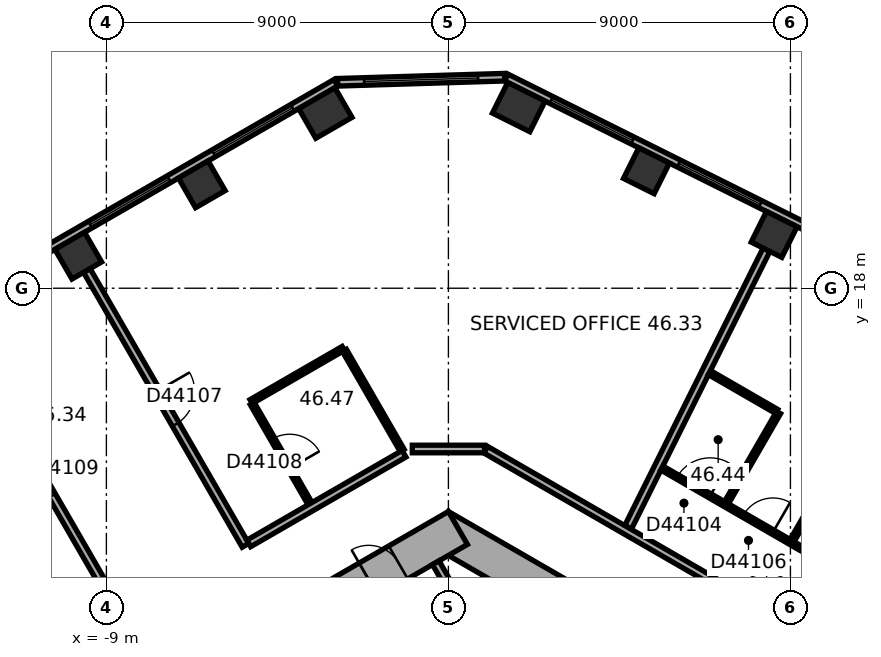
"""IFC4 building model, lengths in metres.
Left out: names, types, materials, properties, quantities, classifications, styles, units other than length and angle.
Written with IfcOpenShell. Run it as: python <this file> out.ifc"""

import sys

from ifc_helpers import new_model, si_unit, direction, frame, frame_2d, origin, origin_2d, place, context, subcontext, project, spatial, rectangle, extrude, element, fill, save


model = new_model("IFC4")
c1 = context("Model", 3, precision=1e-05, world=origin(), true_north=direction((0.0, 1.0)))
c2 = subcontext(c1, "Body", "Model", "MODEL_VIEW")
j1 = project(units=[si_unit("LENGTHUNIT", "METRE"), si_unit("PLANEANGLEUNIT", "RADIAN")], contexts=[c1])
p1 = place(None, origin())
s1 = spatial("IfcSite", under=j1, at=p1, CompositionType="ELEMENT")
p2 = place(p1, origin())
s2 = spatial("IfcBuilding", under=s1, at=p2, CompositionType="ELEMENT")
p3 = place(p2, frame((0.0, 0.0, 187.3)))
s3 = spatial("IfcBuildingStorey", under=s2, at=p3, CompositionType="ELEMENT", Elevation=187.3)
for number, where, z_axis, x_axis in (
    (1, (8.571, 19.416, 0.0), (0.0, 0.0, 1.0), (-0.895, 0.446, 0.0)),
    (2, (5.211, 21.091, 0.0), (0.0, 0.0, 1.0), (-0.895, 0.446, 0.0)),
):
    element("IfcColumn", number, at=place(p3, frame(where, z_axis=z_axis, x_axis=x_axis)), inside=s3, PredefinedType="COLUMN", context=c2, shape_type="SweptSolid", body=[
        extrude(rectangle(XDim=0.9, YDim=0.9, at=origin_2d()), origin(), (0.0, 0.0, 1.0), 3.7),
    ])
for number, where, z_axis, x_axis in (
    (3, (1.852, 22.766, 0.0), (0.0, 0.0, 1.0), (-0.895, 0.446, 0.0)),
    (4, (-3.238, 22.61, 0.0), (0.0, 0.0, 1.0), (-0.866, -0.5, 0.0)),
):
    element("IfcColumn", number, at=place(p3, frame(where, z_axis=z_axis, x_axis=x_axis)), inside=s3, PredefinedType="COLUMN", context=c2, shape_type="SweptSolid", body=[
        extrude(rectangle(XDim=1.1, YDim=0.9, at=origin_2d()), origin(), (0.0, 0.0, 1.0), 3.7),
    ])
for number, where, z_axis, x_axis in (
    (5, (-6.489, 20.733, 0.0), (0.0, 0.0, 1.0), (-0.866, -0.5, 0.0)),
    (6, (-9.74, 18.856, 0.0), (0.0, 0.0, 1.0), (-0.866, -0.5, 0.0)),
):
    element("IfcColumn", number, at=place(p3, frame(where, z_axis=z_axis, x_axis=x_axis)), inside=s3, PredefinedType="COLUMN", context=c2, shape_type="SweptSolid", body=[
        extrude(rectangle(XDim=0.9, YDim=0.9, at=origin_2d()), origin(), (0.0, 0.0, 1.0), 3.7),
    ])
p4 = place(p3, frame((10.25, 5.629, 0.0), z_axis=(0.0, 0.0, 1.0), x_axis=(-0.866022616891, 0.50000482701, 0.0)))
e7 = element("IfcWall", 7, at=p4, inside=s3, PredefinedType="SHEAR", context=c2, shape_type="SweptSolid", body=[
    extrude(rectangle(XDim=12.125, YDim=1.0, at=frame_2d((6.062, 0.0))), origin(), (0.0, 0.0, 1.0), 3.7),
])
p5 = place(p4, frame((5.312, 0.0, 0.0)))
e8 = element("IfcOpeningElement", 8, at=p5, cuts=e7, PredefinedType="OPENING", context=c2, shape_type="SweptSolid", body=[
    extrude(rectangle(XDim=0.9, YDim=2.1, at=frame_2d((0.45, 1.05))), frame((0.0, 0.51, 0.0), z_axis=(0.0, -1.0, 0.0), x_axis=(1.0, 0.0, 0.0)), (0.0, 0.0, 1.0), 1.02),
])
p6 = place(p3, frame((0.25, 11.691, 0.0), z_axis=(0.0, 0.0, 1.0), x_axis=(-0.866022616891, -0.50000482701, 0.0)))
e9 = element("IfcWall", 9, at=p6, inside=s3, PredefinedType="SHEAR", context=c2, shape_type="SweptSolid", body=[
    extrude(rectangle(XDim=12.125, YDim=1.0, at=frame_2d((6.062, 0.0))), origin(), (0.0, 0.0, 1.0), 3.7),
])
p7 = place(p6, frame((6.262, 0.0, 0.0)))
e10 = element("IfcOpeningElement", 10, at=p7, cuts=e9, PredefinedType="OPENING", context=c2, shape_type="SweptSolid", body=[
    extrude(rectangle(XDim=1.5, YDim=2.1, at=frame_2d((0.75, 1.05))), frame((0.0, 0.51, 0.0), z_axis=(0.0, -1.0, 0.0), x_axis=(1.0, 0.0, 0.0)), (0.0, 0.0, 1.0), 1.02),
])
p8 = place(p6, frame((1.812, 0.0, 0.0)))
e11 = element("IfcOpeningElement", 11, at=p8, cuts=e9, PredefinedType="OPENING", context=c2, shape_type="SweptSolid", body=[
    extrude(rectangle(XDim=0.9, YDim=2.1, at=frame_2d((0.45, 1.05))), frame((0.0, 0.51, 0.0), z_axis=(0.0, -1.0, 0.0), x_axis=(1.0, 0.0, 0.0)), (0.0, 0.0, 1.0), 1.02),
])
p9 = place(p6, frame((4.412, 0.0, 0.0)))
e12 = element("IfcOpeningElement", 12, at=p9, cuts=e9, PredefinedType="OPENING", context=c2, shape_type="SweptSolid", body=[
    extrude(rectangle(XDim=0.9, YDim=2.1, at=frame_2d((0.45, 1.05))), frame((0.0, 0.51, 0.0), z_axis=(0.0, -1.0, 0.0), x_axis=(1.0, 0.0, 0.0)), (0.0, 0.0, 1.0), 1.02),
])
p10 = place(p3, frame((19.464, 14.599, 0.0), z_axis=(0.0, 0.0, 1.0), x_axis=(-0.894935755043, 0.446195018289, 0.0)))
e13 = element("IfcWall", 13, at=p10, inside=s3, PredefinedType="STANDARD", context=c2, shape_type="SweptSolid", body=[
    extrude(rectangle(XDim=20.044, YDim=0.2, at=frame_2d((10.022, 0.0))), origin(), (0.0, 0.0, 1.0), 3.7),
])
p11 = place(p10, frame((1.313, 0.0, 0.9)))
e14 = element("IfcOpeningElement", 14, at=p11, cuts=e13, PredefinedType="OPENING", context=c2, shape_type="SweptSolid", body=[
    extrude(rectangle(XDim=2.4, YDim=2.0, at=frame_2d((1.2, 1.0))), frame((0.0, 0.11, 0.0), z_axis=(0.0, -1.0, 0.0), x_axis=(1.0, 0.0, 0.0)), (0.0, 0.0, 1.0), 0.22),
])
p12 = place(p10, frame((5.067, 0.0, 0.9)))
e15 = element("IfcOpeningElement", 15, at=p12, cuts=e13, PredefinedType="OPENING", context=c2, shape_type="SweptSolid", body=[
    extrude(rectangle(XDim=2.4, YDim=2.0, at=frame_2d((1.2, 1.0))), frame((0.0, 0.11, 0.0), z_axis=(0.0, -1.0, 0.0), x_axis=(1.0, 0.0, 0.0)), (0.0, 0.0, 1.0), 0.22),
])
p13 = place(p10, frame((8.821, 0.0, 0.9)))
e16 = element("IfcOpeningElement", 16, at=p13, cuts=e13, PredefinedType="OPENING", context=c2, shape_type="SweptSolid", body=[
    extrude(rectangle(XDim=2.4, YDim=2.0, at=frame_2d((1.2, 1.0))), frame((0.0, 0.11, 0.0), z_axis=(0.0, -1.0, 0.0), x_axis=(1.0, 0.0, 0.0)), (0.0, 0.0, 1.0), 0.22),
])
p14 = place(p10, frame((12.575, 0.0, 0.9)))
e17 = element("IfcOpeningElement", 17, at=p14, cuts=e13, PredefinedType="OPENING", context=c2, shape_type="SweptSolid", body=[
    extrude(rectangle(XDim=2.4, YDim=2.0, at=frame_2d((1.2, 1.0))), frame((0.0, 0.11, 0.0), z_axis=(0.0, -1.0, 0.0), x_axis=(1.0, 0.0, 0.0)), (0.0, 0.0, 1.0), 0.22),
])
p15 = place(p10, frame((16.329, 0.0, 0.9)))
e18 = element("IfcOpeningElement", 18, at=p15, cuts=e13, PredefinedType="OPENING", context=c2, shape_type="SweptSolid", body=[
    extrude(rectangle(XDim=2.4, YDim=2.0, at=frame_2d((1.2, 1.0))), frame((0.0, 0.11, 0.0), z_axis=(0.0, -1.0, 0.0), x_axis=(1.0, 0.0, 0.0)), (0.0, 0.0, 1.0), 0.22),
])
p16 = place(p3, frame((1.479, 23.553, 0.0), z_axis=(0.0, 0.0, 1.0), x_axis=(-0.999534786117, -0.03049936625, 0.0)))
e19 = element("IfcWall", 19, at=p16, inside=s3, PredefinedType="STANDARD", context=c2, shape_type="SweptSolid", body=[
    extrude(rectangle(XDim=4.395, YDim=0.2, at=frame_2d((2.197, 0.0))), origin(), (0.0, 0.0, 1.0), 3.7),
])
p17 = place(p16, frame((0.698, 0.0, 0.9)))
e20 = element("IfcOpeningElement", 20, at=p17, cuts=e19, PredefinedType="OPENING", context=c2, shape_type="SweptSolid", body=[
    extrude(rectangle(XDim=3.0, YDim=2.0, at=frame_2d((1.5, 1.0))), frame((0.0, 0.11, 0.0), z_axis=(0.0, -1.0, 0.0), x_axis=(1.0, 0.0, 0.0)), (0.0, 0.0, 1.0), 0.22),
])
p18 = place(p3, frame((-2.961, 23.405, 0.0), z_axis=(0.0, 0.0, 1.0), x_axis=(-0.866023315909, -0.500003616288, 0.0)))
e21 = element("IfcWall", 21, at=p18, inside=s3, PredefinedType="STANDARD", context=c2, shape_type="SweptSolid", body=[
    extrude(rectangle(XDim=20.044, YDim=0.2, at=frame_2d((10.022, 0.0))), origin(), (0.0, 0.0, 1.0), 3.7),
])
p19 = place(p18, frame((1.314, 0.0, 0.9)))
e22 = element("IfcOpeningElement", 22, at=p19, cuts=e21, PredefinedType="OPENING", context=c2, shape_type="SweptSolid", body=[
    extrude(rectangle(XDim=2.4, YDim=2.0, at=frame_2d((1.2, 1.0))), frame((0.0, 0.11, 0.0), z_axis=(0.0, -1.0, 0.0), x_axis=(1.0, 0.0, 0.0)), (0.0, 0.0, 1.0), 0.22),
])
p20 = place(p18, frame((5.069, 0.0, 0.9)))
e23 = element("IfcOpeningElement", 23, at=p20, cuts=e21, PredefinedType="OPENING", context=c2, shape_type="SweptSolid", body=[
    extrude(rectangle(XDim=2.4, YDim=2.0, at=frame_2d((1.2, 1.0))), frame((0.0, 0.11, 0.0), z_axis=(0.0, -1.0, 0.0), x_axis=(1.0, 0.0, 0.0)), (0.0, 0.0, 1.0), 0.22),
])
p21 = place(p18, frame((8.823, 0.0, 0.9)))
e24 = element("IfcOpeningElement", 24, at=p21, cuts=e21, PredefinedType="OPENING", context=c2, shape_type="SweptSolid", body=[
    extrude(rectangle(XDim=2.4, YDim=2.0, at=frame_2d((1.2, 1.0))), frame((0.0, 0.11, 0.0), z_axis=(0.0, -1.0, 0.0), x_axis=(1.0, 0.0, 0.0)), (0.0, 0.0, 1.0), 0.22),
])
p22 = place(p18, frame((12.577, 0.0, 0.9)))
e25 = element("IfcOpeningElement", 25, at=p22, cuts=e21, PredefinedType="OPENING", context=c2, shape_type="SweptSolid", body=[
    extrude(rectangle(XDim=2.4, YDim=2.0, at=frame_2d((1.2, 1.0))), frame((0.0, 0.11, 0.0), z_axis=(0.0, -1.0, 0.0), x_axis=(1.0, 0.0, 0.0)), (0.0, 0.0, 1.0), 0.22),
])
p23 = place(p18, frame((16.331, 0.0, 0.9)))
e26 = element("IfcOpeningElement", 26, at=p23, cuts=e21, PredefinedType="OPENING", context=c2, shape_type="SweptSolid", body=[
    extrude(rectangle(XDim=2.4, YDim=2.0, at=frame_2d((1.2, 1.0))), frame((0.0, 0.11, 0.0), z_axis=(0.0, -1.0, 0.0), x_axis=(1.0, 0.0, 0.0)), (0.0, 0.0, 1.0), 0.22),
])
p24 = place(p3, frame((0.767, 8.872, 0.0), z_axis=(0.0, 0.0, 1.0), x_axis=(-0.499994660107, 0.866028486751, 0.0)))
e27 = element("IfcWall", 27, at=p24, inside=s3, PredefinedType="PARTITIONING", context=c2, shape_type="SweptSolid", body=[
    extrude(rectangle(XDim=2.2, YDim=0.2, at=frame_2d((1.1, 0.0))), origin(), (0.0, 0.0, 1.0), 3.42),
])
p25 = place(p3, frame((-12.766, 16.589, 0.0), z_axis=(0.0, 0.0, 1.0), x_axis=(0.500010139422, -0.866019549707, 0.0)))
e28 = element("IfcWall", 28, at=p25, inside=s3, PredefinedType="PARTITIONING", context=c2, shape_type="SweptSolid", body=[
    extrude(rectangle(XDim=8.35, YDim=0.2, at=frame_2d((4.175, 0.0))), origin(), (0.0, 0.0, 1.0), 3.42),
])
p26 = place(p25, frame((3.675, 0.0, 0.0)))
e29 = element("IfcOpeningElement", 29, at=p26, cuts=e28, PredefinedType="OPENING", context=c2, shape_type="SweptSolid", body=[
    extrude(rectangle(XDim=1.0, YDim=2.1, at=frame_2d((0.5, 1.05))), frame((0.0, 0.11, 0.0), z_axis=(0.0, -1.0, 0.0), x_axis=(1.0, 0.0, 0.0)), (0.0, 0.0, 1.0), 0.22),
])
p27 = place(p3, frame((-9.515, 18.466, 0.0), z_axis=(0.0, 0.0, 1.0), x_axis=(0.500010139422, -0.866019549707, 0.0)))
e30 = element("IfcWall", 30, at=p27, inside=s3, PredefinedType="PARTITIONING", context=c2, shape_type="SweptSolid", body=[
    extrude(rectangle(XDim=8.35, YDim=0.2, at=frame_2d((4.175, 0.0))), origin(), (0.0, 0.0, 1.0), 2.87),
])
p28 = place(p27, frame((3.675, 0.0, 0.0)))
e31 = element("IfcOpeningElement", 31, at=p28, cuts=e30, PredefinedType="OPENING", context=c2, shape_type="SweptSolid", body=[
    extrude(rectangle(XDim=1.0, YDim=2.1, at=frame_2d((0.5, 1.05))), frame((0.0, 0.11, 0.0), z_axis=(0.0, -1.0, 0.0), x_axis=(1.0, 0.0, 0.0)), (0.0, 0.0, 1.0), 0.22),
])
p29 = place(p3, frame((-5.191, 15.016, 0.0), z_axis=(0.0, 0.0, 1.0), x_axis=(0.866034573852, 0.49998411664, 0.0)))
e32 = element("IfcWall", 32, at=p29, inside=s3, PredefinedType="PARTITIONING", context=c2, shape_type="SweptSolid", body=[
    extrude(rectangle(XDim=2.8, YDim=0.12, at=frame_2d((1.4, 0.0))), origin(), (0.0, 0.0, 1.0), 3.42),
])
p30 = place(p3, frame((-3.641, 12.331, 0.0), z_axis=(0.0, 0.0, 1.0), x_axis=(-0.499991248344, 0.866030456496, 0.0)))
e33 = element("IfcWall", 33, at=p30, inside=s3, PredefinedType="PARTITIONING", context=c2, shape_type="SweptSolid", body=[
    extrude(rectangle(XDim=3.04, YDim=0.12, at=frame_2d((1.52, 0.0))), origin(), (0.0, 0.0, 1.0), 3.42),
])
p31 = place(p30, frame((1.07, 0.0, 0.0)))
e34 = element("IfcOpeningElement", 34, at=p31, cuts=e33, PredefinedType="OPENING", context=c2, shape_type="SweptSolid", body=[
    extrude(rectangle(XDim=0.9, YDim=2.1, at=frame_2d((0.45, 1.05))), frame((0.0, 0.07, 0.0), z_axis=(0.0, -1.0, 0.0), x_axis=(1.0, 0.0, 0.0)), (0.0, 0.0, 1.0), 0.14),
])
p32 = place(p3, frame((-2.737, 16.364, 0.0), z_axis=(0.0, 0.0, 1.0), x_axis=(0.500026023896, -0.86601037836, 0.0)))
e35 = element("IfcWall", 35, at=p32, inside=s3, PredefinedType="PARTITIONING", context=c2, shape_type="SweptSolid", body=[
    extrude(rectangle(XDim=3.04, YDim=0.12, at=frame_2d((1.52, 0.0))), origin(), (0.0, 0.0, 1.0), 3.42),
])
p33 = place(p3, frame((-1.167, 13.645, 0.0), z_axis=(0.0, 0.0, 1.0), x_axis=(-0.866034830959, -0.499983671299, 0.0)))
e36 = element("IfcWall", 36, at=p33, inside=s3, PredefinedType="PARTITIONING", context=c2, shape_type="SweptSolid", body=[
    extrude(rectangle(XDim=4.719, YDim=0.2, at=frame_2d((2.36, 0.0))), origin(), (0.0, 0.0, 1.0), 3.42),
])
p34 = place(p3, frame((0.95, 13.77, 0.0), z_axis=(0.0, 0.0, 1.0), x_axis=(-1.0, 0.0, 0.0)))
e37 = element("IfcWall", 37, at=p34, inside=s3, PredefinedType="PARTITIONING", context=c2, shape_type="SweptSolid", body=[
    extrude(rectangle(XDim=1.9, YDim=0.2, at=frame_2d((0.95, 0.0))), origin(), (0.0, 0.0, 1.0), 3.42),
])
p35 = place(p3, frame((7.318, 12.356, 0.0), z_axis=(0.0, 0.0, 1.0), x_axis=(0.499982138324, 0.866035715982, 0.0)))
e38 = element("IfcWall", 38, at=p35, inside=s3, PredefinedType="PARTITIONING", context=c2, shape_type="SweptSolid", body=[
    extrude(rectangle(XDim=2.74, YDim=0.12, at=frame_2d((1.37, 0.0))), origin(), (0.0, 0.0, 1.0), 3.42),
])
p36 = place(p3, frame((8.37, 19.013, 0.0), z_axis=(0.0, 0.0, 1.0), x_axis=(-0.446183598632, -0.894941448538, 0.0)))
e39 = element("IfcWall", 39, at=p36, inside=s3, PredefinedType="PARTITIONING", context=c2, shape_type="SweptSolid", body=[
    extrude(rectangle(XDim=8.156, YDim=0.2, at=frame_2d((4.078, 0.0))), origin(), (0.0, 0.0, 1.0), 3.42),
])
p37 = place(p3, frame((8.636, 14.759, 0.0), z_axis=(0.0, 0.0, 1.0), x_axis=(-0.866010195725, 0.500026340207, 0.0)))
e40 = element("IfcWall", 40, at=p37, inside=s3, PredefinedType="PARTITIONING", context=c2, shape_type="SweptSolid", body=[
    extrude(rectangle(XDim=2.04, YDim=0.12, at=frame_2d((1.02, 0.0))), origin(), (0.0, 0.0, 1.0), 3.42),
])
p38 = place(p3, frame((11.196, 7.854, 0.0), z_axis=(0.0, 0.0, 1.0), x_axis=(-0.866023877043, 0.500002644385, 0.0)))
e41 = element("IfcWall", 41, at=p38, inside=s3, PredefinedType="PARTITIONING", context=c2, shape_type="SweptSolid", body=[
    extrude(rectangle(XDim=11.792, YDim=0.2, at=frame_2d((5.896, 0.0))), origin(), (0.0, 0.0, 1.0), 3.42),
])
p39 = place(p38, frame((3.261, 0.0, 0.0)))
e42 = element("IfcOpeningElement", 42, at=p39, cuts=e41, PredefinedType="OPENING", context=c2, shape_type="SweptSolid", body=[
    extrude(rectangle(XDim=1.0, YDim=2.1, at=frame_2d((0.5, 1.05))), frame((0.0, 0.11, 0.0), z_axis=(0.0, -1.0, 0.0), x_axis=(1.0, 0.0, 0.0)), (0.0, 0.0, 1.0), 0.22),
])
p40 = place(p3, frame((11.959, 9.608, 0.0), z_axis=(0.0, 0.0, 1.0), x_axis=(-0.866018452427, 0.500012039911, 0.0)))
e43 = element("IfcWall", 43, at=p40, inside=s3, PredefinedType="PARTITIONING", context=c2, shape_type="SweptSolid", body=[
    extrude(rectangle(XDim=7.322, YDim=0.12, at=frame_2d((3.661, 0.0))), origin(), (0.0, 0.0, 1.0), 3.42),
])
p41 = place(p40, frame((5.858, 0.0, 0.0)))
e44 = element("IfcOpeningElement", 44, at=p41, cuts=e43, PredefinedType="OPENING", context=c2, shape_type="SweptSolid", body=[
    extrude(rectangle(XDim=1.0, YDim=2.1, at=frame_2d((0.5, 1.05))), frame((0.0, 0.07, 0.0), z_axis=(0.0, -1.0, 0.0), x_axis=(1.0, 0.0, 0.0)), (0.0, 0.0, 1.0), 0.14),
])
p42 = place(p40, frame((1.25, 0.0, 0.0)))
e45 = element("IfcOpeningElement", 45, at=p42, cuts=e43, PredefinedType="OPENING", context=c2, shape_type="SweptSolid", body=[
    extrude(rectangle(XDim=0.9, YDim=2.1, at=frame_2d((0.45, 1.05))), frame((0.0, 0.07, 0.0), z_axis=(0.0, -1.0, 0.0), x_axis=(1.0, 0.0, 0.0)), (0.0, 0.0, 1.0), 0.14),
])
p43 = place(p40, frame((3.947, 0.0, 0.0)))
e46 = element("IfcOpeningElement", 46, at=p43, cuts=e43, PredefinedType="OPENING", context=c2, shape_type="SweptSolid", body=[
    extrude(rectangle(XDim=0.9, YDim=2.1, at=frame_2d((0.45, 1.05))), frame((0.0, 0.07, 0.0), z_axis=(0.0, -1.0, 0.0), x_axis=(1.0, 0.0, 0.0)), (0.0, 0.0, 1.0), 0.14),
])
p44 = place(p3, frame((12.325, 17.041, 0.0), z_axis=(0.0, 0.0, 1.0), x_axis=(-0.499985538654, -0.866033752885, 0.0)))
e47 = element("IfcWall", 47, at=p44, inside=s3, PredefinedType="PARTITIONING", context=c2, shape_type="SweptSolid", body=[
    extrude(rectangle(XDim=6.56, YDim=0.12, at=frame_2d((3.28, 0.0))), origin(), (0.0, 0.0, 1.0), 3.42),
])
p45 = place(p14, origin())
e48 = element("IfcWindow", 48, at=p45, inside=s3, PartitioningType="SINGLE_PANEL", PredefinedType="WINDOW", context=c2, shape_type="SweptSolid", body=[
    extrude(rectangle(XDim=2.4, YDim=2.0, at=frame_2d((1.2, 1.0))), frame((0.0, 0.03, 0.0), z_axis=(0.0, -1.0, 0.0), x_axis=(1.0, 0.0, 0.0)), (0.0, 0.0, 1.0), 0.06),
])
fill(e17, e48)
p46 = place(p15, origin())
e49 = element("IfcWindow", 49, at=p46, inside=s3, PartitioningType="SINGLE_PANEL", PredefinedType="WINDOW", context=c2, shape_type="SweptSolid", body=[
    extrude(rectangle(XDim=2.4, YDim=2.0, at=frame_2d((1.2, 1.0))), frame((0.0, 0.03, 0.0), z_axis=(0.0, -1.0, 0.0), x_axis=(1.0, 0.0, 0.0)), (0.0, 0.0, 1.0), 0.06),
])
fill(e18, e49)
p47 = place(p17, origin())
e50 = element("IfcWindow", 50, at=p47, inside=s3, PartitioningType="SINGLE_PANEL", PredefinedType="WINDOW", context=c2, shape_type="SweptSolid", body=[
    extrude(rectangle(XDim=3.0, YDim=2.0, at=frame_2d((1.5, 1.0))), frame((0.0, 0.03, 0.0), z_axis=(0.0, -1.0, 0.0), x_axis=(1.0, 0.0, 0.0)), (0.0, 0.0, 1.0), 0.06),
])
fill(e20, e50)
p48 = place(p19, origin())
e51 = element("IfcWindow", 51, at=p48, inside=s3, PartitioningType="SINGLE_PANEL", PredefinedType="WINDOW", context=c2, shape_type="SweptSolid", body=[
    extrude(rectangle(XDim=2.4, YDim=2.0, at=frame_2d((1.2, 1.0))), frame((0.0, 0.03, 0.0), z_axis=(0.0, -1.0, 0.0), x_axis=(1.0, 0.0, 0.0)), (0.0, 0.0, 1.0), 0.06),
])
fill(e22, e51)
p49 = place(p20, origin())
e52 = element("IfcWindow", 52, at=p49, inside=s3, PartitioningType="SINGLE_PANEL", PredefinedType="WINDOW", context=c2, shape_type="SweptSolid", body=[
    extrude(rectangle(XDim=2.4, YDim=2.0, at=frame_2d((1.2, 1.0))), frame((0.0, 0.03, 0.0), z_axis=(0.0, -1.0, 0.0), x_axis=(1.0, 0.0, 0.0)), (0.0, 0.0, 1.0), 0.06),
])
fill(e23, e52)
p50 = place(p8, origin())
e53 = element("IfcDoor", 53, at=p50, inside=s3, OperationType="SINGLE_SWING_LEFT", PredefinedType="DOOR", context=c2, shape_type="SweptSolid", body=[
    extrude(rectangle(XDim=0.9, YDim=2.1, at=frame_2d((0.45, 1.05))), frame((0.0, 0.025, 0.0), z_axis=(0.0, -1.0, 0.0), x_axis=(1.0, 0.0, 0.0)), (0.0, 0.0, 1.0), 0.05),
])
fill(e11, e53)
p51 = place(p41, origin())
e54 = element("IfcDoor", 54, at=p51, inside=s3, OperationType="SINGLE_SWING_LEFT", PredefinedType="DOOR", context=c2, shape_type="SweptSolid", body=[
    extrude(rectangle(XDim=1.0, YDim=2.1, at=frame_2d((0.5, 1.05))), frame((0.0, 0.025, 0.0), z_axis=(0.0, -1.0, 0.0), x_axis=(1.0, 0.0, 0.0)), (0.0, 0.0, 1.0), 0.05),
])
fill(e44, e54)
p52 = place(p43, origin())
e55 = element("IfcDoor", 55, at=p52, inside=s3, OperationType="SINGLE_SWING_LEFT", PredefinedType="DOOR", context=c2, shape_type="SweptSolid", body=[
    extrude(rectangle(XDim=0.9, YDim=2.1, at=frame_2d((0.45, 1.05))), frame((0.0, 0.025, 0.0), z_axis=(0.0, -1.0, 0.0), x_axis=(1.0, 0.0, 0.0)), (0.0, 0.0, 1.0), 0.05),
])
fill(e46, e55)
p53 = place(p28, origin())
e56 = element("IfcDoor", 56, at=p53, inside=s3, OperationType="SINGLE_SWING_LEFT", PredefinedType="DOOR", context=c2, shape_type="SweptSolid", body=[
    extrude(rectangle(XDim=1.0, YDim=2.1, at=frame_2d((0.5, 1.05))), frame((0.0, 0.025, 0.0), z_axis=(0.0, -1.0, 0.0), x_axis=(1.0, 0.0, 0.0)), (0.0, 0.0, 1.0), 0.05),
])
fill(e31, e56)
p54 = place(p31, origin())
e57 = element("IfcDoor", 57, at=p54, inside=s3, OperationType="SINGLE_SWING_LEFT", PredefinedType="DOOR", context=c2, shape_type="SweptSolid", body=[
    extrude(rectangle(XDim=0.9, YDim=2.1, at=frame_2d((0.45, 1.05))), frame((0.0, 0.025, 0.0), z_axis=(0.0, -1.0, 0.0), x_axis=(1.0, 0.0, 0.0)), (0.0, 0.0, 1.0), 0.05),
])
fill(e34, e57)
p55 = place(p26, origin())
e58 = element("IfcDoor", 58, at=p55, inside=s3, OperationType="SINGLE_SWING_LEFT", PredefinedType="DOOR", context=c2, shape_type="SweptSolid", body=[
    extrude(rectangle(XDim=1.0, YDim=2.1, at=frame_2d((0.5, 1.05))), frame((0.0, 0.025, 0.0), z_axis=(0.0, -1.0, 0.0), x_axis=(1.0, 0.0, 0.0)), (0.0, 0.0, 1.0), 0.05),
])
fill(e29, e58)
save(model, sys.argv[1])
